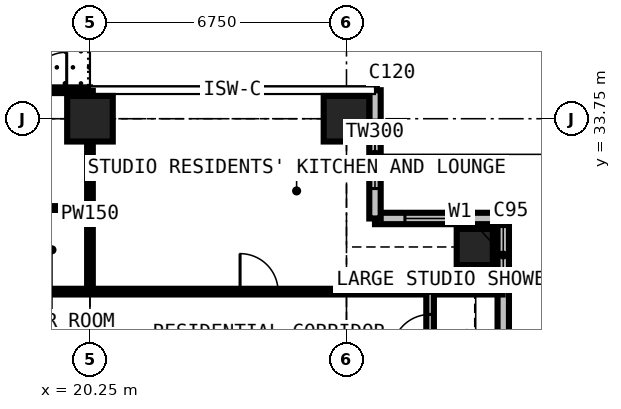
"""IFC4 building model, lengths in metres.
Left out: names, types, materials, properties, quantities, classifications, styles, units other than length and angle.
Written with IfcOpenShell. Run it as: python <this file> out.ifc"""

import sys

from ifc_helpers import new_model, si_unit, direction, frame, frame_2d, origin, origin_2d, place, context, subcontext, project, spatial, rectangle, extrude, element, fill, save


model = new_model("IFC4")
c1 = context("Model", 3, precision=1e-05, world=origin(), true_north=direction((0.0, 1.0)))
c2 = subcontext(c1, "Body", "Model", "MODEL_VIEW")
j1 = project(units=[si_unit("LENGTHUNIT", "METRE"), si_unit("PLANEANGLEUNIT", "RADIAN")], contexts=[c1])
p1 = place(None, origin())
s1 = spatial("IfcSite", under=j1, at=p1, CompositionType="ELEMENT")
p2 = place(p1, origin())
s2 = spatial("IfcBuilding", under=s1, at=p2, CompositionType="ELEMENT")
p3 = place(p2, frame((0.0, 0.0, 178.2)))
s3 = spatial("IfcBuildingStorey", under=s2, at=p3, CompositionType="ELEMENT", Elevation=178.2)
for number, where, z_axis, x_axis in (
    (1, (20.25, 33.75, 0.0), (0.0, 0.0, 1.0), (1.0, 0.0, 0.0)),
    (2, (27.0, 33.75, 0.0), (0.0, 0.0, 1.0), (1.0, 0.0, 0.0)),
):
    element("IfcColumn", number, at=place(p3, frame(where, z_axis=z_axis, x_axis=x_axis)), inside=s3, PredefinedType="COLUMN", context=c2, shape_type="SweptSolid", body=[
        extrude(rectangle(XDim=1.2, YDim=1.2, at=origin_2d()), origin(), (0.0, 0.0, 1.0), 3.6),
    ])
p4 = place(p3, frame((30.375, 30.375, 0.0), z_axis=(0.0, 0.0, 1.0), x_axis=(1.0, 0.0, 0.0)))
e3 = element("IfcColumn", 3, at=p4, inside=s3, PredefinedType="COLUMN", context=c2, shape_type="SweptSolid", body=[
    extrude(rectangle(XDim=0.95, YDim=0.95, at=origin_2d()), origin(), (0.0, 0.0, 1.0), 3.6),
])
p5 = place(p3, frame((31.125, 27.75, 0.0), z_axis=(0.0, 0.0, 1.0), x_axis=(0.0, 1.0, 0.0)))
e4 = element("IfcWall", 4, at=p5, inside=s3, PredefinedType="SOLIDWALL", context=c2, shape_type="SweptSolid", body=[
    extrude(rectangle(XDim=3.375, YDim=0.3, at=frame_2d((1.688, 0.0))), origin(), (0.0, 0.0, 1.0), 3.375),
])
p6 = place(p5, frame((1.663, 0.0, 0.9)))
e5 = element("IfcOpeningElement", 5, at=p6, cuts=e4, PredefinedType="OPENING", context=c2, shape_type="SweptSolid", body=[
    extrude(rectangle(XDim=1.5, YDim=1.8, at=frame_2d((0.75, 0.9))), frame((0.0, 0.16, 0.0), z_axis=(0.0, -1.0, 0.0), x_axis=(1.0, 0.0, 0.0)), (0.0, 0.0, 1.0), 0.32),
])
p7 = place(p3, frame((31.125, 31.125, 0.0), z_axis=(0.0, 0.0, 1.0), x_axis=(-1.0, 0.0, 0.0)))
e6 = element("IfcWall", 6, at=p7, inside=s3, PredefinedType="SOLIDWALL", context=c2, shape_type="SweptSolid", body=[
    extrude(rectangle(XDim=3.375, YDim=0.3, at=frame_2d((1.688, 0.0))), origin(), (0.0, 0.0, 1.0), 3.375),
])
p8 = place(p7, frame((0.788, 0.0, 0.6)))
e7 = element("IfcOpeningElement", 7, at=p8, cuts=e6, PredefinedType="OPENING", context=c2, shape_type="SweptSolid", body=[
    extrude(rectangle(XDim=1.8, YDim=2.1, at=frame_2d((0.9, 1.05))), frame((0.0, 0.16, 0.0), z_axis=(0.0, -1.0, 0.0), x_axis=(1.0, 0.0, 0.0)), (0.0, 0.0, 1.0), 0.32),
])
p9 = place(p3, frame((27.75, 31.125, 0.0), z_axis=(0.0, 0.0, 1.0), x_axis=(0.0, 1.0, 0.0)))
e8 = element("IfcWall", 8, at=p9, inside=s3, PredefinedType="SOLIDWALL", context=c2, shape_type="SweptSolid", body=[
    extrude(rectangle(XDim=3.375, YDim=0.3, at=frame_2d((1.688, 0.0))), origin(), (0.0, 0.0, 1.0), 3.375),
])
p10 = place(p9, frame((0.788, 0.0, 0.6)))
e9 = element("IfcOpeningElement", 9, at=p10, cuts=e8, PredefinedType="OPENING", context=c2, shape_type="SweptSolid", body=[
    extrude(rectangle(XDim=1.8, YDim=2.1, at=frame_2d((0.9, 1.05))), frame((0.0, 0.16, 0.0), z_axis=(0.0, -1.0, 0.0), x_axis=(1.0, 0.0, 0.0)), (0.0, 0.0, 1.0), 0.32),
])
p11 = place(p3, frame((13.5, 34.5, 0.0), z_axis=(0.0, 0.0, 1.0), x_axis=(1.0, 0.0, 0.0)))
e10 = element("IfcWall", 10, at=p11, inside=s3, PredefinedType="SOLIDWALL", context=c2, shape_type="SweptSolid", body=[
    extrude(rectangle(XDim=6.75, YDim=0.15, at=frame_2d((3.375, 0.0))), origin(), (0.0, 0.0, 1.0), 3.375),
])
p12 = place(p11, frame((0.613, 0.0, 0.0)))
e11 = element("IfcOpeningElement", 11, at=p12, cuts=e10, PredefinedType="OPENING", context=c2, shape_type="SweptSolid", body=[
    extrude(rectangle(XDim=1.0, YDim=2.2, at=frame_2d((0.5, 1.1))), frame((0.0, 0.085, 0.0), z_axis=(0.0, -1.0, 0.0), x_axis=(1.0, 0.0, 0.0)), (0.0, 0.0, 1.0), 0.17),
])
p13 = place(p11, frame((1.725, 0.0, 0.9)))
e12 = element("IfcOpeningElement", 12, at=p13, cuts=e10, PredefinedType="OPENING", context=c2, shape_type="SweptSolid", body=[
    extrude(rectangle(XDim=1.2, YDim=1.8, at=frame_2d((0.6, 0.9))), frame((0.0, 0.085, 0.0), z_axis=(0.0, -1.0, 0.0), x_axis=(1.0, 0.0, 0.0)), (0.0, 0.0, 1.0), 0.17),
])
p14 = place(p11, frame((5.137, 0.0, 0.0)))
e13 = element("IfcOpeningElement", 13, at=p14, cuts=e10, PredefinedType="OPENING", context=c2, shape_type="SweptSolid", body=[
    extrude(rectangle(XDim=1.0, YDim=2.2, at=frame_2d((0.5, 1.1))), frame((0.0, 0.085, 0.0), z_axis=(0.0, -1.0, 0.0), x_axis=(1.0, 0.0, 0.0)), (0.0, 0.0, 1.0), 0.17),
])
p15 = place(p11, frame((3.825, 0.0, 0.9)))
e14 = element("IfcOpeningElement", 14, at=p15, cuts=e10, PredefinedType="OPENING", context=c2, shape_type="SweptSolid", body=[
    extrude(rectangle(XDim=1.2, YDim=1.8, at=frame_2d((0.6, 0.9))), frame((0.0, 0.085, 0.0), z_axis=(0.0, -1.0, 0.0), x_axis=(1.0, 0.0, 0.0)), (0.0, 0.0, 1.0), 0.17),
])
p16 = place(p3, frame((11.3, 29.2, 0.0), z_axis=(0.0, 0.0, 1.0), x_axis=(1.0, 0.0, 0.0)))
e15 = element("IfcWall", 15, at=p16, inside=s3, PredefinedType="PARTITIONING", context=c2, shape_type="SweptSolid", body=[
    extrude(rectangle(XDim=19.809, YDim=0.15, at=frame_2d((9.904, 0.0))), origin(), (0.0, 0.0, 1.0), 3.375),
])
p17 = place(p16, frame((12.9, 0.0, 0.0)))
e16 = element("IfcOpeningElement", 16, at=p17, cuts=e15, PredefinedType="OPENING", context=c2, shape_type="SweptSolid", body=[
    extrude(rectangle(XDim=1.0, YDim=2.2, at=frame_2d((0.5, 1.1))), frame((0.0, 0.085, 0.0), z_axis=(0.0, -1.0, 0.0), x_axis=(1.0, 0.0, 0.0)), (0.0, 0.0, 1.0), 0.17),
])
p18 = place(p16, frame((5.825, 0.0, 0.0)))
e17 = element("IfcOpeningElement", 17, at=p18, cuts=e15, PredefinedType="OPENING", context=c2, shape_type="SweptSolid", body=[
    extrude(rectangle(XDim=0.95, YDim=2.2, at=frame_2d((0.475, 1.1))), frame((0.0, 0.085, 0.0), z_axis=(0.0, -1.0, 0.0), x_axis=(1.0, 0.0, 0.0)), (0.0, 0.0, 1.0), 0.17),
])
p19 = place(p16, frame((0.6, 0.0, 0.0)))
e18 = element("IfcOpeningElement", 18, at=p19, cuts=e15, PredefinedType="OPENING", context=c2, shape_type="SweptSolid", body=[
    extrude(rectangle(XDim=1.0, YDim=2.2, at=frame_2d((0.5, 1.1))), frame((0.0, 0.085, 0.0), z_axis=(0.0, -1.0, 0.0), x_axis=(1.0, 0.0, 0.0)), (0.0, 0.0, 1.0), 0.17),
])
p20 = place(p3, frame((18.25, 31.4, 0.0), z_axis=(0.0, 0.0, 1.0), x_axis=(1.0, 0.0, 0.0)))
e19 = element("IfcWall", 19, at=p20, inside=s3, PredefinedType="PARTITIONING", context=c2, shape_type="SweptSolid", body=[
    extrude(rectangle(XDim=2.0, YDim=0.1, at=frame_2d((1.0, 0.0))), origin(), (0.0, 0.0, 1.0), 3.375),
])
p21 = place(p3, frame((20.25, 29.2, 0.0), z_axis=(0.0, 0.0, 1.0), x_axis=(0.0, 1.0, 0.0)))
e20 = element("IfcWall", 20, at=p21, inside=s3, PredefinedType="PARTITIONING", context=c2, shape_type="SweptSolid", body=[
    extrude(rectangle(XDim=5.284, YDim=0.15, at=frame_2d((2.642, 0.0))), origin(), (0.0, 0.0, 1.0), 2.806),
])
p22 = place(p3, frame((29.2, 11.3, 0.0), z_axis=(0.0, 0.0, 1.0), x_axis=(0.0, 1.0, 0.0)))
e21 = element("IfcWall", 21, at=p22, inside=s3, PredefinedType="PARTITIONING", context=c2, shape_type="SweptSolid", body=[
    extrude(rectangle(XDim=17.9, YDim=0.2, at=frame_2d((8.95, 0.0))), origin(), (0.0, 0.0, 1.0), 3.375),
])
p23 = place(p22, frame((10.55, 0.0, 0.0)))
e22 = element("IfcOpeningElement", 22, at=p23, cuts=e21, PredefinedType="OPENING", context=c2, shape_type="SweptSolid", body=[
    extrude(rectangle(XDim=0.95, YDim=2.2, at=frame_2d((0.475, 1.1))), frame((0.0, 0.11, 0.0), z_axis=(0.0, -1.0, 0.0), x_axis=(1.0, 0.0, 0.0)), (0.0, 0.0, 1.0), 0.22),
])
p24 = place(p22, frame((5.775, 0.0, 0.0)))
e23 = element("IfcOpeningElement", 23, at=p24, cuts=e21, PredefinedType="OPENING", context=c2, shape_type="SweptSolid", body=[
    extrude(rectangle(XDim=0.95, YDim=2.2, at=frame_2d((0.475, 1.1))), frame((0.0, 0.11, 0.0), z_axis=(0.0, -1.0, 0.0), x_axis=(1.0, 0.0, 0.0)), (0.0, 0.0, 1.0), 0.22),
])
p25 = place(p22, frame((16.3, 0.0, 0.0)))
e24 = element("IfcOpeningElement", 24, at=p25, cuts=e21, PredefinedType="OPENING", context=c2, shape_type="SweptSolid", body=[
    extrude(rectangle(XDim=1.0, YDim=2.2, at=frame_2d((0.5, 1.1))), frame((0.0, 0.11, 0.0), z_axis=(0.0, -1.0, 0.0), x_axis=(1.0, 0.0, 0.0)), (0.0, 0.0, 1.0), 0.22),
])
p26 = place(p6, origin())
e25 = element("IfcWindow", 25, at=p26, inside=s3, PartitioningType="SINGLE_PANEL", PredefinedType="WINDOW", context=c2, shape_type="SweptSolid", body=[
    extrude(rectangle(XDim=1.5, YDim=1.8, at=frame_2d((0.75, 0.9))), frame((0.0, 0.03, 0.0), z_axis=(0.0, -1.0, 0.0), x_axis=(1.0, 0.0, 0.0)), (0.0, 0.0, 1.0), 0.06),
])
fill(e5, e25)
p27 = place(p8, origin())
e26 = element("IfcWindow", 26, at=p27, inside=s3, PartitioningType="SINGLE_PANEL", PredefinedType="WINDOW", context=c2, shape_type="SweptSolid", body=[
    extrude(rectangle(XDim=1.8, YDim=2.1, at=frame_2d((0.9, 1.05))), frame((0.0, 0.03, 0.0), z_axis=(0.0, -1.0, 0.0), x_axis=(1.0, 0.0, 0.0)), (0.0, 0.0, 1.0), 0.06),
])
fill(e7, e26)
p28 = place(p10, origin())
e27 = element("IfcWindow", 27, at=p28, inside=s3, PartitioningType="SINGLE_PANEL", PredefinedType="WINDOW", context=c2, shape_type="SweptSolid", body=[
    extrude(rectangle(XDim=1.8, YDim=2.1, at=frame_2d((0.9, 1.05))), frame((0.0, 0.03, 0.0), z_axis=(0.0, -1.0, 0.0), x_axis=(1.0, 0.0, 0.0)), (0.0, 0.0, 1.0), 0.06),
])
fill(e9, e27)
p29 = place(p14, origin())
e28 = element("IfcDoor", 28, at=p29, inside=s3, OperationType="SINGLE_SWING_RIGHT", PredefinedType="DOOR", context=c2, shape_type="SweptSolid", body=[
    extrude(rectangle(XDim=1.0, YDim=2.2, at=frame_2d((0.5, 1.1))), frame((0.0, 0.025, 0.0), z_axis=(0.0, -1.0, 0.0), x_axis=(1.0, 0.0, 0.0)), (0.0, 0.0, 1.0), 0.05),
])
fill(e13, e28)
p30 = place(p25, origin())
e29 = element("IfcDoor", 29, at=p30, inside=s3, OperationType="SINGLE_SWING_LEFT", PredefinedType="DOOR", context=c2, shape_type="SweptSolid", body=[
    extrude(rectangle(XDim=1.0, YDim=2.2, at=frame_2d((0.5, 1.1))), frame((0.0, 0.025, 0.0), z_axis=(0.0, -1.0, 0.0), x_axis=(1.0, 0.0, 0.0)), (0.0, 0.0, 1.0), 0.05),
])
fill(e24, e29)
p31 = place(p17, origin())
e30 = element("IfcDoor", 30, at=p31, inside=s3, OperationType="SINGLE_SWING_LEFT", PredefinedType="DOOR", context=c2, shape_type="SweptSolid", body=[
    extrude(rectangle(XDim=1.0, YDim=2.2, at=frame_2d((0.5, 1.1))), frame((0.0, 0.025, 0.0), z_axis=(0.0, -1.0, 0.0), x_axis=(1.0, 0.0, 0.0)), (0.0, 0.0, 1.0), 0.05),
])
fill(e16, e30)
save(model, sys.argv[1])
